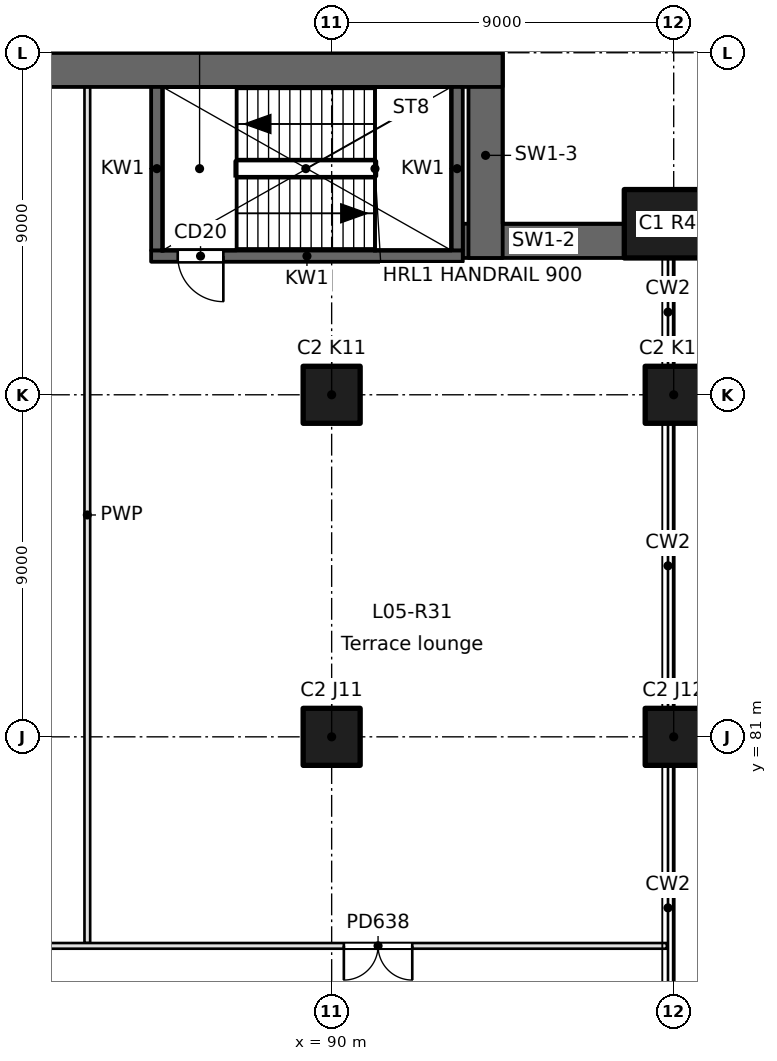
"""IFC4 building model, lengths in metres.
Left out: names, types, materials, properties, quantities, classifications, styles, units other than length and angle.
Written with IfcOpenShell. Run it as: python <this file> out.ifc"""

import sys

from ifc_helpers import new_model, si_unit, direction, frame, frame_2d, origin, origin_2d, place, context, subcontext, project, spatial, rectangle, extrude, element, fill, save


model = new_model("IFC4")
c1 = context("Model", 3, precision=1e-05, world=origin(), true_north=direction((0.0, 1.0)))
c2 = subcontext(c1, "Body", "Model", "MODEL_VIEW")
j1 = project(units=[si_unit("LENGTHUNIT", "METRE"), si_unit("PLANEANGLEUNIT", "RADIAN")], contexts=[c1])
p1 = place(None, origin())
s1 = spatial("IfcSite", under=j1, at=p1, CompositionType="ELEMENT")
p2 = place(p1, origin())
s2 = spatial("IfcBuilding", under=s1, at=p2, CompositionType="ELEMENT")
p3 = place(p2, frame((0.0, 0.0, 26.4)))
s3 = spatial("IfcBuildingStorey", under=s2, at=p3, CompositionType="ELEMENT", Elevation=26.4)
for number, where, z_axis, x_axis in (
    (1, (99.0, 81.0, 0.0), (0.0, 0.0, 1.0), (1.0, 0.0, 0.0)),
    (2, (99.0, 90.0, 0.0), (0.0, 0.0, 1.0), (1.0, 0.0, 0.0)),
):
    element("IfcColumn", number, at=place(p3, frame(where, z_axis=z_axis, x_axis=x_axis)), inside=s3, PredefinedType="COLUMN", context=c2, shape_type="SweptSolid", body=[
        extrude(rectangle(XDim=1.5, YDim=1.5, at=origin_2d()), origin(), (0.0, 0.0, 1.0), 4.8),
    ])
p4 = place(p3, frame((99.0, 94.5, 0.0), z_axis=(0.0, 0.0, 1.0), x_axis=(1.0, 0.0, 0.0)))
e3 = element("IfcColumn", 3, at=p4, inside=s3, PredefinedType="COLUMN", context=c2, shape_type="SweptSolid", body=[
    extrude(rectangle(XDim=2.6, YDim=1.8, at=origin_2d()), origin(), (0.0, 0.0, 1.0), 4.8),
])
for number, where, z_axis, x_axis in (
    (4, (90.0, 81.0, 0.0), (0.0, 0.0, 1.0), (1.0, 0.0, 0.0)),
    (5, (90.0, 90.0, 0.0), (0.0, 0.0, 1.0), (1.0, 0.0, 0.0)),
):
    element("IfcColumn", number, at=place(p3, frame(where, z_axis=z_axis, x_axis=x_axis)), inside=s3, PredefinedType="COLUMN", context=c2, shape_type="SweptSolid", body=[
        extrude(rectangle(XDim=1.5, YDim=1.5, at=origin_2d()), origin(), (0.0, 0.0, 1.0), 4.8),
    ])
p5 = place(p3, frame((97.7, 94.05, 0.0), z_axis=(0.0, 0.0, 1.0), x_axis=(-1.0, 0.0, 0.0)))
e6 = element("IfcWall", 6, at=p5, inside=s3, PredefinedType="SHEAR", context=c2, shape_type="SweptSolid", body=[
    extrude(rectangle(XDim=4.25, YDim=0.9, at=frame_2d((2.125, 0.0))), origin(), (0.0, 0.0, 1.0), 4.8),
])
p6 = place(p3, frame((94.05, 93.6, 0.0), z_axis=(0.0, 0.0, 1.0), x_axis=(0.0, 1.0, 0.0)))
e7 = element("IfcWall", 7, at=p6, inside=s3, PredefinedType="SHEAR", context=c2, shape_type="SweptSolid", body=[
    extrude(rectangle(XDim=5.4, YDim=0.9, at=frame_2d((2.7, 0.0))), origin(), (0.0, 0.0, 1.0), 4.8),
])
p7 = place(p3, frame((94.5, 98.55, 0.0), z_axis=(0.0, 0.0, 1.0), x_axis=(-1.0, 0.0, 0.0)))
e8 = element("IfcWall", 8, at=p7, inside=s3, PredefinedType="SHEAR", context=c2, shape_type="SweptSolid", body=[
    extrude(rectangle(XDim=90.0, YDim=0.9, at=frame_2d((45.0, 0.0))), origin(), (0.0, 0.0, 1.0), 4.8),
])
p8 = place(p3, frame((85.25, 93.65, -0.35), z_axis=(0.0, 0.0, 1.0), x_axis=(1.0, 0.0, 0.0)))
e9 = element("IfcWall", 9, at=p8, inside=s3, PredefinedType="SOLIDWALL", context=c2, shape_type="SweptSolid", body=[
    extrude(rectangle(XDim=8.2, YDim=0.3, at=frame_2d((4.1, 0.0))), origin(), (0.0, 0.0, 1.0), 4.7),
])
p9 = place(p8, frame((0.7, 0.0, 0.35)))
e10 = element("IfcOpeningElement", 10, at=p9, cuts=e9, PredefinedType="OPENING", context=c2, shape_type="SweptSolid", body=[
    extrude(rectangle(XDim=1.2, YDim=2.1, at=frame_2d((0.6, 1.05))), frame((0.0, 0.15, 0.0), z_axis=(0.0, -1.0, 0.0), x_axis=(1.0, 0.0, 0.0)), (0.0, 0.0, 1.0), 0.3),
])
for number, where, z_axis, x_axis in (
    (11, (85.4, 93.8, -0.35), (0.0, 0.0, 1.0), (0.0, 1.0, 0.0)),
    (12, (93.3, 93.8, -0.35), (0.0, 0.0, 1.0), (0.0, 1.0, 0.0)),
):
    element("IfcWall", number, at=place(p3, frame(where, z_axis=z_axis, x_axis=x_axis)), inside=s3, PredefinedType="SOLIDWALL", context=c2, shape_type="SweptSolid", body=[
        extrude(rectangle(XDim=4.3, YDim=0.3, at=frame_2d((2.15, 0.0))), origin(), (0.0, 0.0, 1.0), 4.7),
    ])
p10 = place(p3, frame((83.571, 75.575, 0.0), z_axis=(0.0, 0.0, 1.0), x_axis=(0.0, 1.0, 0.0)))
e13 = element("IfcWall", 13, at=p10, inside=s3, PredefinedType="PARTITIONING", context=c2, shape_type="SweptSolid", body=[
    extrude(rectangle(XDim=22.525, YDim=0.15, at=frame_2d((11.263, 0.0))), origin(), (0.0, 0.0, 1.0), 4.35),
])
p11 = place(p3, frame((98.82, 75.5, 0.0), z_axis=(0.0, 0.0, 1.0), x_axis=(-1.0, 0.0, 0.0)))
e14 = element("IfcWall", 14, at=p11, inside=s3, PredefinedType="PARTITIONING", context=c2, shape_type="SweptSolid", body=[
    extrude(rectangle(XDim=52.945, YDim=0.15, at=frame_2d((26.473, 0.0))), origin(), (0.0, 0.0, 1.0), 4.35),
])
p12 = place(p11, frame((46.445, 0.0, 0.0)))
e15 = element("IfcOpeningElement", 15, at=p12, cuts=e14, PredefinedType="OPENING", context=c2, shape_type="SweptSolid", body=[
    extrude(rectangle(XDim=1.0, YDim=2.1, at=frame_2d((0.5, 1.05))), frame((0.0, 0.075, 0.0), z_axis=(0.0, -1.0, 0.0), x_axis=(1.0, 0.0, 0.0)), (0.0, 0.0, 1.0), 0.15),
])
p13 = place(p11, frame((33.963, 0.0, 0.0)))
e16 = element("IfcOpeningElement", 16, at=p13, cuts=e14, PredefinedType="OPENING", context=c2, shape_type="SweptSolid", body=[
    extrude(rectangle(XDim=1.0, YDim=2.1, at=frame_2d((0.5, 1.05))), frame((0.0, 0.075, 0.0), z_axis=(0.0, -1.0, 0.0), x_axis=(1.0, 0.0, 0.0)), (0.0, 0.0, 1.0), 0.15),
])
p14 = place(p11, frame((20.806, 0.0, 0.0)))
e17 = element("IfcOpeningElement", 17, at=p14, cuts=e14, PredefinedType="OPENING", context=c2, shape_type="SweptSolid", body=[
    extrude(rectangle(XDim=1.8, YDim=2.1, at=frame_2d((0.9, 1.05))), frame((0.0, 0.075, 0.0), z_axis=(0.0, -1.0, 0.0), x_axis=(1.0, 0.0, 0.0)), (0.0, 0.0, 1.0), 0.15),
])
p15 = place(p11, frame((6.699, 0.0, 0.0)))
e18 = element("IfcOpeningElement", 18, at=p15, cuts=e14, PredefinedType="OPENING", context=c2, shape_type="SweptSolid", body=[
    extrude(rectangle(XDim=1.8, YDim=2.1, at=frame_2d((0.9, 1.05))), frame((0.0, 0.075, 0.0), z_axis=(0.0, -1.0, 0.0), x_axis=(1.0, 0.0, 0.0)), (0.0, 0.0, 1.0), 0.15),
])
p16 = place(p9, frame((1.2, 0.0, 0.0), z_axis=(0.0, 0.0, 1.0), x_axis=(-1.0, 0.0, 0.0)))
e19 = element("IfcDoor", 19, at=p16, inside=s3, OperationType="SINGLE_SWING_LEFT", PredefinedType="DOOR", context=c2, shape_type="SweptSolid", body=[
    extrude(rectangle(XDim=1.2, YDim=2.1, at=frame_2d((0.6, 1.05))), frame((0.0, 0.025, 0.0), z_axis=(0.0, -1.0, 0.0), x_axis=(1.0, 0.0, 0.0)), (0.0, 0.0, 1.0), 0.05),
])
fill(e10, e19)
p17 = place(p15, origin())
e20 = element("IfcDoor", 20, at=p17, inside=s3, OperationType="DOUBLE_DOOR_SINGLE_SWING", PredefinedType="DOOR", context=c2, shape_type="SweptSolid", body=[
    extrude(rectangle(XDim=1.8, YDim=2.1, at=frame_2d((0.9, 1.05))), frame((0.0, 0.025, 0.0), z_axis=(0.0, -1.0, 0.0), x_axis=(1.0, 0.0, 0.0)), (0.0, 0.0, 1.0), 0.05),
])
fill(e18, e20)
save(model, sys.argv[1])
